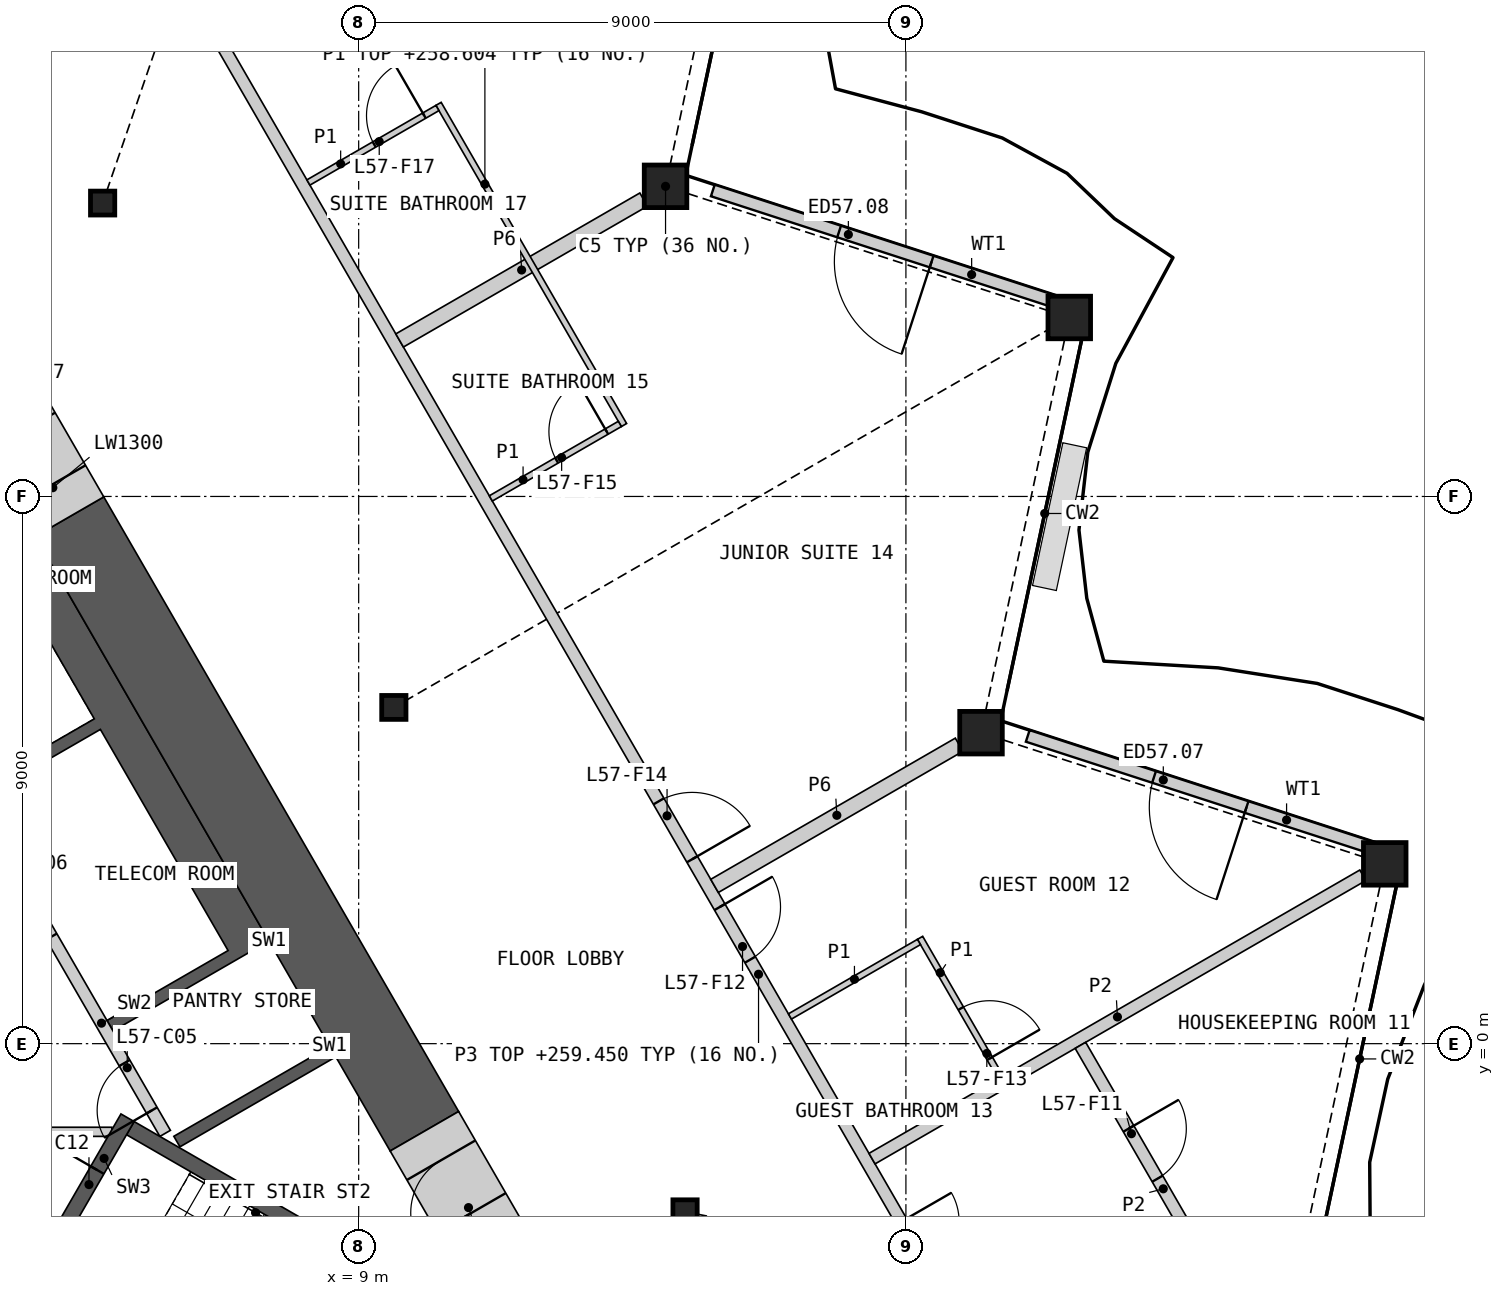
"""IFC4 building model, lengths in metres.
Left out: names, types, materials, properties, quantities, classifications, styles, units other than length and angle.
Written with IfcOpenShell. Run it as: python <this file> out.ifc"""

import sys

from ifc_helpers import new_model, si_unit, direction, frame, frame_2d, origin, origin_2d, place, context, subcontext, project, spatial, polyline, rectangle, hollow_rectangle, i_section, outline, extrude, element, fill, save


model = new_model("IFC4")
c1 = context("Model", 3, precision=1e-05, world=origin(), true_north=direction((0.0, 1.0)))
c2 = subcontext(c1, "Body", "Model", "MODEL_VIEW")
j1 = project(units=[si_unit("LENGTHUNIT", "METRE"), si_unit("PLANEANGLEUNIT", "RADIAN")], contexts=[c1])
p1 = place(None, origin())
s1 = spatial("IfcSite", under=j1, at=p1, CompositionType="ELEMENT")
p2 = place(p1, origin())
s2 = spatial("IfcBuilding", under=s1, at=p2, CompositionType="ELEMENT")
p3 = place(p2, frame((0.0, 0.0, 256.2)))
s3 = spatial("IfcBuildingStorey", under=s2, at=p3, CompositionType="ELEMENT", Elevation=256.2)
for number, where, z_axis, x_axis in (
    (1, (25.875, 2.957, 0.0), (0.0, 0.0, 1.0), (1.0, 0.0, 0.0)),
    (2, (19.235, 5.115, 0.0), (0.0, 0.0, 1.0), (1.0, 0.0, 0.0)),
    (3, (20.687, 11.943, 0.0), (0.0, 0.0, 1.0), (1.0, 0.0, 0.0)),
    (4, (14.047, 14.101, 0.0), (0.0, 0.0, 1.0), (1.0, 0.0, 0.0)),
):
    element("IfcColumn", number, at=place(p3, frame(where, z_axis=z_axis, x_axis=x_axis)), inside=s3, PredefinedType="COLUMN", context=c2, shape_type="SweptSolid", body=[
        extrude(hollow_rectangle(XDim=0.7, YDim=0.7, WallThickness=0.045, at=origin_2d()), origin(), (0.0, 0.0, 1.0), 3.6),
    ])
for number, where, z_axis, x_axis in (
    (5, (14.368, -2.765, 0.0), (0.0, 0.0, 1.0), (1.0, 0.0, 0.0)),
    (6, (9.578, 5.53, 0.0), (0.0, 0.0, 1.0), (1.0, 0.0, 0.0)),
    (7, (4.789, 13.825, 0.0), (0.0, 0.0, 1.0), (1.0, 0.0, 0.0)),
):
    element("IfcColumn", number, at=place(p3, frame(where, z_axis=z_axis, x_axis=x_axis)), inside=s3, PredefinedType="COLUMN", context=c2, shape_type="SweptSolid", body=[
        extrude(i_section(OverallWidth=0.399, OverallDepth=0.393, WebThickness=0.023, FlangeThickness=0.037, at=origin_2d()), origin(), (0.0, 0.0, 1.0), 3.6),
    ])
p4 = place(p3, frame((25.679, 3.217, 0.0), z_axis=(0.0, 0.0, 1.0), x_axis=(-0.951049400374, 0.309038894069, 0.0)))
e8 = element("IfcWall", 8, at=p4, inside=s3, PredefinedType="SOLIDWALL", context=c2, shape_type="SweptSolid", body=[
    extrude(rectangle(XDim=5.968, YDim=0.2, at=frame_2d((2.984, 0.0))), origin(), (0.0, 0.0, 1.0), 2.701),
])
p5 = place(p4, frame((2.184, 0.0, 0.0)))
e9 = element("IfcOpeningElement", 9, at=p5, cuts=e8, PredefinedType="OPENING", context=c2, shape_type="SweptSolid", body=[
    extrude(rectangle(XDim=1.6, YDim=2.4, at=frame_2d((0.8, 1.2))), frame((0.0, 0.11, 0.0), z_axis=(0.0, -1.0, 0.0), x_axis=(1.0, 0.0, 0.0)), (0.0, 0.0, 1.0), 0.22),
])
p6 = place(p3, frame((20.5, 12.188, 0.0), z_axis=(0.0, 0.0, 1.0), x_axis=(-0.951053307318, 0.309026870418, 0.0)))
e10 = element("IfcWall", 10, at=p6, inside=s3, PredefinedType="SOLIDWALL", context=c2, shape_type="SweptSolid", body=[
    extrude(rectangle(XDim=5.968, YDim=0.2, at=frame_2d((2.984, 0.0))), origin(), (0.0, 0.0, 1.0), 2.701),
])
p7 = place(p6, frame((2.184, 0.0, 0.0)))
e11 = element("IfcOpeningElement", 11, at=p7, cuts=e10, PredefinedType="OPENING", context=c2, shape_type="SweptSolid", body=[
    extrude(rectangle(XDim=1.6, YDim=2.4, at=frame_2d((0.8, 1.2))), frame((0.0, 0.11, 0.0), z_axis=(0.0, -1.0, 0.0), x_axis=(1.0, 0.0, 0.0)), (0.0, 0.0, 1.0), 0.22),
])
p8 = place(p3, origin())
e12 = element("IfcWall", 12, at=p8, inside=s3, PredefinedType="SHEAR", context=c2, shape_type="SweptSolid", body=[
    extrude(outline(polyline([(8.524, -0.044), (8.624, -0.217), (8.231, -0.444), (6.061, -1.697), (5.96, -1.524), (8.131, -0.271), (8.524, -0.044)])), origin(), (0.0, 0.0, 1.0), 3.25),
])
p9 = place(p3, origin())
e13 = element("IfcWall", 13, at=p9, inside=s3, PredefinedType="SHEAR", context=c2, shape_type="SweptSolid", body=[
    extrude(outline(polyline([(7.524, 1.688), (7.131, 1.461), (4.96, 0.208), (4.861, 0.381), (6.852, 1.531), (4.752, 5.169), (2.76, 4.019), (2.66, 4.192), (4.652, 5.342), (3.652, 7.074), (1.66, 5.924), (1.561, 6.097), (3.731, 7.35), (4.124, 7.577), (7.524, 1.688)])), origin(), (0.0, 0.0, 1.0), 3.25),
])
p10 = place(p3, frame((5.817, -1.476, 0.0), z_axis=(0.0, 0.0, 1.0), x_axis=(-0.500002616675, 0.866023893041, 0.0)))
e14 = element("IfcWall", 14, at=p10, inside=s3, PredefinedType="SOLIDWALL", context=c2, shape_type="SweptSolid", body=[
    extrude(rectangle(XDim=8.373, YDim=0.2, at=frame_2d((4.187, 0.0))), origin(), (0.0, 0.0, 1.0), 3.25),
])
p11 = place(p10, frame((0.437, 0.0, 0.0)))
e15 = element("IfcOpeningElement", 15, at=p11, cuts=e14, PredefinedType="OPENING", context=c2, shape_type="SweptSolid", body=[
    extrude(rectangle(XDim=0.9, YDim=2.1, at=frame_2d((0.45, 1.05))), frame((0.0, 0.11, 0.0), z_axis=(0.0, -1.0, 0.0), x_axis=(1.0, 0.0, 0.0)), (0.0, 0.0, 1.0), 0.22),
])
p12 = place(p10, frame((3.737, 0.0, 0.0)))
e16 = element("IfcOpeningElement", 16, at=p12, cuts=e14, PredefinedType="OPENING", context=c2, shape_type="SweptSolid", body=[
    extrude(rectangle(XDim=0.9, YDim=2.1, at=frame_2d((0.45, 1.05))), frame((0.0, 0.11, 0.0), z_axis=(0.0, -1.0, 0.0), x_axis=(1.0, 0.0, 0.0)), (0.0, 0.0, 1.0), 0.22),
])
p13 = place(p10, frame((6.937, 0.0, 0.0)))
e17 = element("IfcOpeningElement", 17, at=p13, cuts=e14, PredefinedType="OPENING", context=c2, shape_type="SweptSolid", body=[
    extrude(rectangle(XDim=1.1, YDim=2.1, at=frame_2d((0.55, 1.05))), frame((0.0, 0.11, 0.0), z_axis=(0.0, -1.0, 0.0), x_axis=(1.0, 0.0, 0.0)), (0.0, 0.0, 1.0), 0.22),
])
p14 = place(p3, frame((-4.941, -1.45, 0.0), z_axis=(0.0, 0.0, 1.0), x_axis=(1.0, 0.0, 0.0)))
e18 = element("IfcWall", 18, at=p14, inside=s3, PredefinedType="PARTITIONING", context=c2, shape_type="SweptSolid", body=[
    extrude(rectangle(XDim=9.882, YDim=0.15, at=frame_2d((4.941, 0.0))), origin(), (0.0, 0.0, 1.0), 3.25),
])
p15 = place(p14, frame((4.391, 0.0, 0.0)))
e19 = element("IfcOpeningElement", 19, at=p15, cuts=e18, PredefinedType="OPENING", context=c2, shape_type="SweptSolid", body=[
    extrude(rectangle(XDim=1.1, YDim=2.1, at=frame_2d((0.55, 1.05))), frame((0.0, 0.085, 0.0), z_axis=(0.0, -1.0, 0.0), x_axis=(1.0, 0.0, 0.0)), (0.0, 0.0, 1.0), 0.17),
])
p16 = place(p3, origin())
e20 = element("IfcWall", 20, at=p16, inside=s3, PredefinedType="SHEAR", context=c2, shape_type="SweptSolid", body=[
    extrude(outline(polyline([(10.032, -4.298), (10.374, -4.206), (5.307, -1.281), (5.182, -1.498), (10.032, -4.298)])), origin(), (0.0, 0.0, 1.0), 3.25),
])
p17 = place(p3, frame((3.655, -3.893, 0.0), z_axis=(0.0, 0.0, 1.0), x_axis=(0.499982516597, 0.866035497597, 0.0)))
e21 = element("IfcWall", 21, at=p17, inside=s3, PredefinedType="SHEAR", context=c2, shape_type="SweptSolid", body=[
    extrude(rectangle(XDim=3.088, YDim=0.25, at=frame_2d((1.544, 0.0))), origin(), (0.0, 0.0, 1.0), 3.25),
])
p18 = place(p17, frame((0.994, 0.0, 0.0)))
e22 = element("IfcOpeningElement", 22, at=p18, cuts=e21, PredefinedType="OPENING", context=c2, shape_type="SweptSolid", body=[
    extrude(rectangle(XDim=1.1, YDim=2.1, at=frame_2d((0.55, 1.05))), frame((0.0, 0.135, 0.0), z_axis=(0.0, -1.0, 0.0), x_axis=(1.0, 0.0, 0.0)), (0.0, 0.0, 1.0), 0.27),
])
p19 = place(p3, frame((10.081, -1.441, 0.0), z_axis=(0.0, 0.0, 1.0), x_axis=(-0.500006109471, 0.866021876451, 0.0)))
e23 = element("IfcWall", 23, at=p19, inside=s3, PredefinedType="SHEAR", context=c2, shape_type="SweptSolid", body=[
    extrude(rectangle(XDim=11.672, YDim=1.3, at=frame_2d((5.836, 0.0))), origin(), (0.0, 0.0, 1.0), 3.25),
])
p20 = place(p3, frame((11.181, -3.346, 0.0), z_axis=(0.0, 0.0, 1.0), x_axis=(-0.499946605688, 0.86605622881, 0.0)))
e24 = element("IfcWall", 24, at=p20, inside=s3, PredefinedType="SHEAR", context=c2, shape_type="SweptSolid", body=[
    extrude(rectangle(XDim=2.2, YDim=1.3, at=frame_2d((1.1, 0.0))), origin(), (0.0, 0.0, 1.0), 3.25),
])
p21 = place(p20, frame((0.65, 0.0, 0.0)))
e25 = element("IfcOpeningElement", 25, at=p21, cuts=e24, PredefinedType="OPENING", context=c2, shape_type="SweptSolid", body=[
    extrude(rectangle(XDim=1.0, YDim=2.1, at=frame_2d((0.5, 1.05))), frame((0.0, 0.66, 0.0), z_axis=(0.0, -1.0, 0.0), x_axis=(1.0, 0.0, 0.0)), (0.0, 0.0, 1.0), 1.32),
])
p22 = place(p3, frame((4.245, 8.668, 0.0), z_axis=(0.0, 0.0, 1.0), x_axis=(-0.50002983664, 0.866008176907, 0.0)))
e26 = element("IfcWall", 26, at=p22, inside=s3, PredefinedType="SHEAR", context=c2, shape_type="SweptSolid", body=[
    extrude(rectangle(XDim=2.2, YDim=1.3, at=frame_2d((1.1, 0.0))), origin(), (0.0, 0.0, 1.0), 3.25),
])
p23 = place(p22, frame((0.6, 0.0, 0.0)))
e27 = element("IfcOpeningElement", 27, at=p23, cuts=e26, PredefinedType="OPENING", context=c2, shape_type="SweptSolid", body=[
    extrude(rectangle(XDim=1.0, YDim=2.1, at=frame_2d((0.5, 1.05))), frame((0.0, 0.66, 0.0), z_axis=(0.0, -1.0, 0.0), x_axis=(1.0, 0.0, 0.0)), (0.0, 0.0, 1.0), 1.32),
])
p24 = place(p3, frame((5.377, 18.807, 0.0), z_axis=(0.0, 0.0, 1.0), x_axis=(0.499999852422, -0.866025488988, 0.0)))
e28 = element("IfcWall", 28, at=p24, inside=s3, PredefinedType="PARTITIONING", context=c2, shape_type="SweptSolid", body=[
    extrude(rectangle(XDim=27.198, YDim=0.2, at=frame_2d((13.599, 0.0))), origin(), (0.0, 0.0, 1.0), 3.25),
])
p25 = place(p24, frame((25.096, 0.0, 0.0)))
e29 = element("IfcOpeningElement", 29, at=p25, cuts=e28, PredefinedType="OPENING", context=c2, shape_type="SweptSolid", body=[
    extrude(rectangle(XDim=0.95, YDim=2.1, at=frame_2d((0.475, 1.05))), frame((0.0, 0.11, 0.0), z_axis=(0.0, -1.0, 0.0), x_axis=(1.0, 0.0, 0.0)), (0.0, 0.0, 1.0), 0.22),
])
p26 = place(p24, frame((19.122, 0.0, 0.0)))
e30 = element("IfcOpeningElement", 30, at=p26, cuts=e28, PredefinedType="OPENING", context=c2, shape_type="SweptSolid", body=[
    extrude(rectangle(XDim=1.0, YDim=2.1, at=frame_2d((0.5, 1.05))), frame((0.0, 0.11, 0.0), z_axis=(0.0, -1.0, 0.0), x_axis=(1.0, 0.0, 0.0)), (0.0, 0.0, 1.0), 0.22),
])
p27 = place(p24, frame((17.115, 0.0, 0.0)))
e31 = element("IfcOpeningElement", 31, at=p27, cuts=e28, PredefinedType="OPENING", context=c2, shape_type="SweptSolid", body=[
    extrude(rectangle(XDim=1.1, YDim=2.1, at=frame_2d((0.55, 1.05))), frame((0.0, 0.11, 0.0), z_axis=(0.0, -1.0, 0.0), x_axis=(1.0, 0.0, 0.0)), (0.0, 0.0, 1.0), 0.22),
])
p28 = place(p24, frame((0.35, 0.0, 0.0)))
e32 = element("IfcOpeningElement", 32, at=p28, cuts=e28, PredefinedType="OPENING", context=c2, shape_type="SweptSolid", body=[
    extrude(rectangle(XDim=1.1, YDim=2.1, at=frame_2d((0.55, 1.05))), frame((0.0, 0.11, 0.0), z_axis=(0.0, -1.0, 0.0), x_axis=(1.0, 0.0, 0.0)), (0.0, 0.0, 1.0), 0.22),
])
p29 = place(p3, frame((14.853, 2.594, 0.0), z_axis=(0.0, 0.0, 1.0), x_axis=(0.866021891294, 0.500006083763, 0.0)))
e33 = element("IfcWall", 33, at=p29, inside=s3, PredefinedType="PARTITIONING", context=c2, shape_type="SweptSolid", body=[
    extrude(rectangle(XDim=4.645, YDim=0.25, at=frame_2d((2.322, 0.0))), origin(), (0.0, 0.0, 1.0), 2.404),
])
p30 = place(p3, frame((9.673, 11.566, 0.0), z_axis=(0.0, 0.0, 1.0), x_axis=(0.866039966287, 0.499974776157, 0.0)))
e34 = element("IfcWall", 34, at=p30, inside=s3, PredefinedType="PARTITIONING", context=c2, shape_type="SweptSolid", body=[
    extrude(rectangle(XDim=4.635, YDim=0.25, at=frame_2d((2.317, 0.0))), origin(), (0.0, 0.0, 1.0), 2.404),
])
p31 = place(p3, frame((17.443, -1.891, 0.0), z_axis=(0.0, 0.0, 1.0), x_axis=(0.866019838429, 0.500009639354, 0.0)))
e35 = element("IfcWall", 35, at=p31, inside=s3, PredefinedType="PARTITIONING", context=c2, shape_type="SweptSolid", body=[
    extrude(rectangle(XDim=9.321, YDim=0.2, at=frame_2d((4.661, 0.0))), origin(), (0.0, 0.0, 1.0), 2.404),
])
p32 = place(p3, frame((20.87, -0.028, 0.0), z_axis=(0.0, 0.0, 1.0), x_axis=(0.499993928037, -0.866028909405, 0.0)))
e36 = element("IfcWall", 36, at=p32, inside=s3, PredefinedType="PARTITIONING", context=c2, shape_type="SweptSolid", body=[
    extrude(rectangle(XDim=5.449, YDim=0.2, at=frame_2d((2.725, 0.0))), origin(), (0.0, 0.0, 1.0), 2.404),
])
p33 = place(p32, frame((1.583, 0.0, 0.0)))
e37 = element("IfcOpeningElement", 37, at=p33, cuts=e36, PredefinedType="OPENING", context=c2, shape_type="SweptSolid", body=[
    extrude(rectangle(XDim=0.95, YDim=2.1, at=frame_2d((0.475, 1.05))), frame((0.0, 0.11, 0.0), z_axis=(0.0, -1.0, 0.0), x_axis=(1.0, 0.0, 0.0)), (0.0, 0.0, 1.0), 0.22),
])
p34 = place(p3, frame((10.313, 15.457, 0.0), z_axis=(0.0, 0.0, 1.0), x_axis=(0.499978833458, -0.866037623948, 0.0)))
e38 = element("IfcWall", 38, at=p34, inside=s3, PredefinedType="PARTITIONING", context=c2, shape_type="SweptSolid", body=[
    extrude(rectangle(XDim=6.1, YDim=0.1, at=frame_2d((3.05, 0.0))), origin(), (0.0, 0.0, 1.0), 2.404),
])
p35 = place(p3, frame((18.233, 1.74, 0.0), z_axis=(0.0, 0.0, 1.0), x_axis=(0.499993606316, -0.866029095148, 0.0)))
e39 = element("IfcWall", 39, at=p35, inside=s3, PredefinedType="PARTITIONING", context=c2, shape_type="SweptSolid", body=[
    extrude(rectangle(XDim=2.65, YDim=0.1, at=frame_2d((1.325, 0.0))), origin(), (0.0, 0.0, 1.0), 2.404),
])
p36 = place(p35, frame((1.341, 0.0, 0.0)))
e40 = element("IfcOpeningElement", 40, at=p36, cuts=e39, PredefinedType="OPENING", context=c2, shape_type="SweptSolid", body=[
    extrude(rectangle(XDim=0.95, YDim=2.1, at=frame_2d((0.475, 1.05))), frame((0.0, 0.06, 0.0), z_axis=(0.0, -1.0, 0.0), x_axis=(1.0, 0.0, 0.0)), (0.0, 0.0, 1.0), 0.12),
])
p37 = place(p3, frame((16.093, 0.447, 0.0), z_axis=(0.0, 0.0, 1.0), x_axis=(0.866057815567, 0.499943856944, 0.0)))
e41 = element("IfcWall", 41, at=p37, inside=s3, PredefinedType="PARTITIONING", context=c2, shape_type="SweptSolid", body=[
    extrude(rectangle(XDim=2.45, YDim=0.1, at=frame_2d((1.225, 0.0))), origin(), (0.0, 0.0, 1.0), 2.404),
])
p38 = place(p3, frame((11.173, 8.968, 0.0), z_axis=(0.0, 0.0, 1.0), x_axis=(0.866014668023, 0.500018594424, 0.0)))
e42 = element("IfcWall", 42, at=p38, inside=s3, PredefinedType="PARTITIONING", context=c2, shape_type="SweptSolid", body=[
    extrude(rectangle(XDim=2.45, YDim=0.1, at=frame_2d((1.225, 0.0))), origin(), (0.0, 0.0, 1.0), 2.404),
])
p39 = place(p38, frame((1.25, 0.0, 0.0)))
e43 = element("IfcOpeningElement", 43, at=p39, cuts=e42, PredefinedType="OPENING", context=c2, shape_type="SweptSolid", body=[
    extrude(rectangle(XDim=0.95, YDim=2.1, at=frame_2d((0.475, 1.05))), frame((0.0, 0.06, 0.0), z_axis=(0.0, -1.0, 0.0), x_axis=(1.0, 0.0, 0.0)), (0.0, 0.0, 1.0), 0.12),
])
p40 = place(p3, frame((8.173, 14.164, 0.0), z_axis=(0.0, 0.0, 1.0), x_axis=(0.866014668023, 0.500018594424, 0.0)))
e44 = element("IfcWall", 44, at=p40, inside=s3, PredefinedType="PARTITIONING", context=c2, shape_type="SweptSolid", body=[
    extrude(rectangle(XDim=2.45, YDim=0.1, at=frame_2d((1.225, 0.0))), origin(), (0.0, 0.0, 1.0), 2.404),
])
p41 = place(p40, frame((1.25, 0.0, 0.0)))
e45 = element("IfcOpeningElement", 45, at=p41, cuts=e44, PredefinedType="OPENING", context=c2, shape_type="SweptSolid", body=[
    extrude(rectangle(XDim=0.95, YDim=2.1, at=frame_2d((0.475, 1.05))), frame((0.0, 0.06, 0.0), z_axis=(0.0, -1.0, 0.0), x_axis=(1.0, 0.0, 0.0)), (0.0, 0.0, 1.0), 0.12),
])
p42 = place(p5, origin())
e46 = element("IfcDoor", 46, at=p42, inside=s3, OperationType="DOUBLE_DOOR_SINGLE_SWING", PredefinedType="DOOR", context=c2, shape_type="SweptSolid", body=[
    extrude(rectangle(XDim=1.6, YDim=2.4, at=frame_2d((0.8, 1.2))), frame((0.0, 0.025, 0.0), z_axis=(0.0, -1.0, 0.0), x_axis=(1.0, 0.0, 0.0)), (0.0, 0.0, 1.0), 0.05),
])
fill(e9, e46)
p43 = place(p7, origin())
e47 = element("IfcDoor", 47, at=p43, inside=s3, OperationType="DOUBLE_DOOR_SINGLE_SWING", PredefinedType="DOOR", context=c2, shape_type="SweptSolid", body=[
    extrude(rectangle(XDim=1.6, YDim=2.4, at=frame_2d((0.8, 1.2))), frame((0.0, 0.025, 0.0), z_axis=(0.0, -1.0, 0.0), x_axis=(1.0, 0.0, 0.0)), (0.0, 0.0, 1.0), 0.05),
])
fill(e11, e47)
p44 = place(p11, origin())
e48 = element("IfcDoor", 48, at=p44, inside=s3, OperationType="SINGLE_SWING_LEFT", PredefinedType="DOOR", context=c2, shape_type="SweptSolid", body=[
    extrude(rectangle(XDim=0.9, YDim=2.1, at=frame_2d((0.45, 1.05))), frame((0.0, 0.025, 0.0), z_axis=(0.0, -1.0, 0.0), x_axis=(1.0, 0.0, 0.0)), (0.0, 0.0, 1.0), 0.05),
])
fill(e15, e48)
p45 = place(p12, origin())
e49 = element("IfcDoor", 49, at=p45, inside=s3, OperationType="SINGLE_SWING_RIGHT", PredefinedType="DOOR", context=c2, shape_type="SweptSolid", body=[
    extrude(rectangle(XDim=0.9, YDim=2.1, at=frame_2d((0.45, 1.05))), frame((0.0, 0.025, 0.0), z_axis=(0.0, -1.0, 0.0), x_axis=(1.0, 0.0, 0.0)), (0.0, 0.0, 1.0), 0.05),
])
fill(e16, e49)
p46 = place(p18, origin())
e50 = element("IfcDoor", 50, at=p46, inside=s3, OperationType="SINGLE_SWING_RIGHT", PredefinedType="DOOR", context=c2, shape_type="SweptSolid", body=[
    extrude(rectangle(XDim=1.1, YDim=2.1, at=frame_2d((0.55, 1.05))), frame((0.0, 0.025, 0.0), z_axis=(0.0, -1.0, 0.0), x_axis=(1.0, 0.0, 0.0)), (0.0, 0.0, 1.0), 0.05),
])
fill(e22, e50)
p47 = place(p21, origin())
e51 = element("IfcDoor", 51, at=p47, inside=s3, OperationType="SINGLE_SWING_LEFT", PredefinedType="DOOR", context=c2, shape_type="SweptSolid", body=[
    extrude(rectangle(XDim=1.0, YDim=2.1, at=frame_2d((0.5, 1.05))), frame((0.0, 0.405, 0.0), z_axis=(0.0, -1.0, 0.0), x_axis=(1.0, 0.0, 0.0)), (0.0, 0.0, 1.0), 0.05),
])
fill(e25, e51)
p48 = place(p33, origin())
e52 = element("IfcDoor", 52, at=p48, inside=s3, OperationType="SINGLE_SWING_LEFT", PredefinedType="DOOR", context=c2, shape_type="SweptSolid", body=[
    extrude(rectangle(XDim=0.95, YDim=2.1, at=frame_2d((0.475, 1.05))), frame((0.0, 0.025, 0.0), z_axis=(0.0, -1.0, 0.0), x_axis=(1.0, 0.0, 0.0)), (0.0, 0.0, 1.0), 0.05),
])
fill(e37, e52)
p49 = place(p26, origin())
e53 = element("IfcDoor", 53, at=p49, inside=s3, OperationType="SINGLE_SWING_LEFT", PredefinedType="DOOR", context=c2, shape_type="SweptSolid", body=[
    extrude(rectangle(XDim=1.0, YDim=2.1, at=frame_2d((0.5, 1.05))), frame((0.0, 0.025, 0.0), z_axis=(0.0, -1.0, 0.0), x_axis=(1.0, 0.0, 0.0)), (0.0, 0.0, 1.0), 0.05),
])
fill(e30, e53)
p50 = place(p36, origin())
e54 = element("IfcDoor", 54, at=p50, inside=s3, OperationType="SINGLE_SWING_RIGHT", PredefinedType="DOOR", context=c2, shape_type="SweptSolid", body=[
    extrude(rectangle(XDim=0.95, YDim=2.1, at=frame_2d((0.475, 1.05))), frame((0.0, 0.025, 0.0), z_axis=(0.0, -1.0, 0.0), x_axis=(1.0, 0.0, 0.0)), (0.0, 0.0, 1.0), 0.05),
])
fill(e40, e54)
p51 = place(p27, origin())
e55 = element("IfcDoor", 55, at=p51, inside=s3, OperationType="SINGLE_SWING_RIGHT", PredefinedType="DOOR", context=c2, shape_type="SweptSolid", body=[
    extrude(rectangle(XDim=1.1, YDim=2.1, at=frame_2d((0.55, 1.05))), frame((0.0, 0.025, 0.0), z_axis=(0.0, -1.0, 0.0), x_axis=(1.0, 0.0, 0.0)), (0.0, 0.0, 1.0), 0.05),
])
fill(e31, e55)
p52 = place(p39, origin())
e56 = element("IfcDoor", 56, at=p52, inside=s3, OperationType="SINGLE_SWING_RIGHT", PredefinedType="DOOR", context=c2, shape_type="SweptSolid", body=[
    extrude(rectangle(XDim=0.95, YDim=2.1, at=frame_2d((0.475, 1.05))), frame((0.0, 0.025, 0.0), z_axis=(0.0, -1.0, 0.0), x_axis=(1.0, 0.0, 0.0)), (0.0, 0.0, 1.0), 0.05),
])
fill(e43, e56)
p53 = place(p41, origin())
e57 = element("IfcDoor", 57, at=p53, inside=s3, OperationType="SINGLE_SWING_RIGHT", PredefinedType="DOOR", context=c2, shape_type="SweptSolid", body=[
    extrude(rectangle(XDim=0.95, YDim=2.1, at=frame_2d((0.475, 1.05))), frame((0.0, 0.025, 0.0), z_axis=(0.0, -1.0, 0.0), x_axis=(1.0, 0.0, 0.0)), (0.0, 0.0, 1.0), 0.05),
])
fill(e45, e57)
save(model, sys.argv[1])
